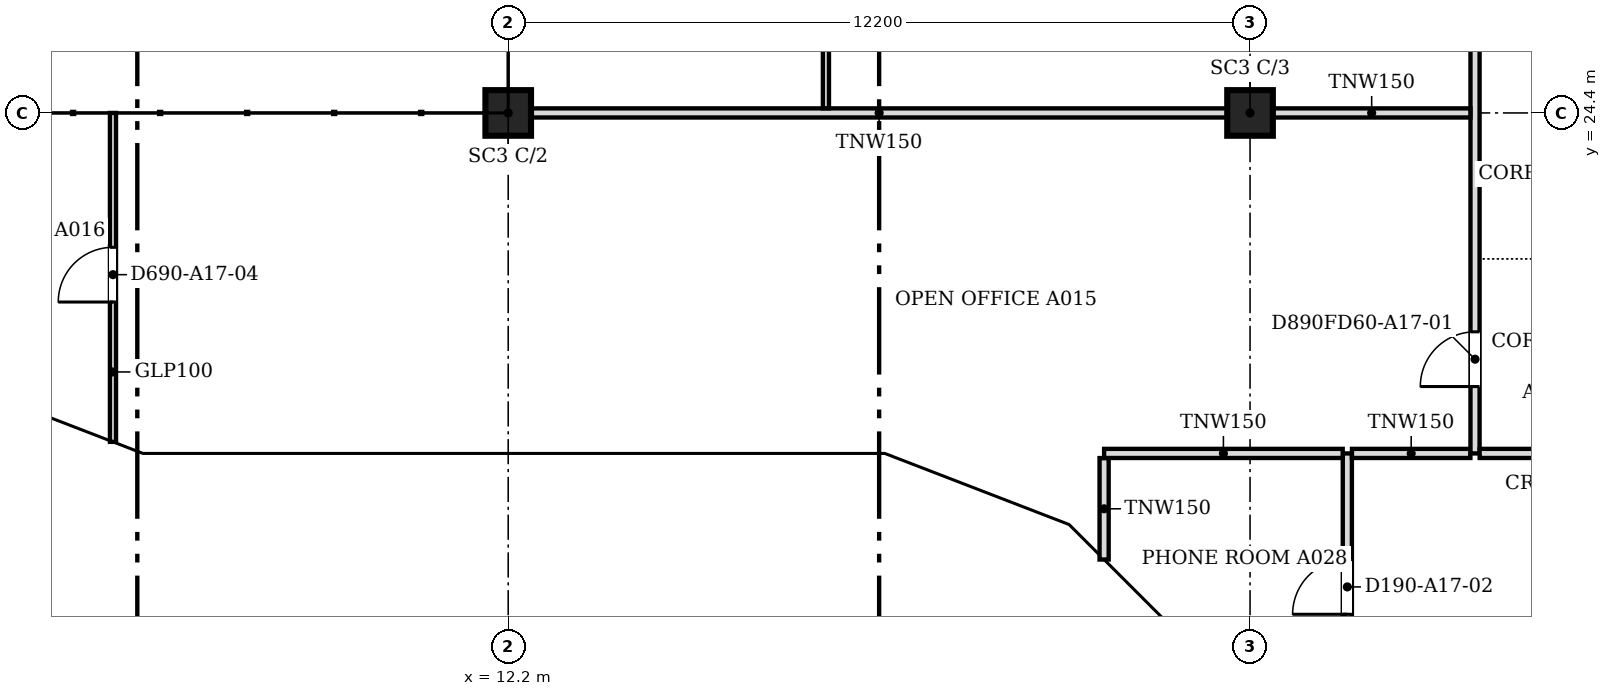
"""IFC4 building model, lengths in metres.
Left out: names, types, materials, properties, quantities, classifications, styles, units other than length and angle.
Written with IfcOpenShell. Run it as: python <this file> out.ifc"""

import sys

from ifc_helpers import new_model, si_unit, direction, frame, frame_2d, origin, origin_2d, place, context, subcontext, project, spatial, polyline, rectangle, outline, extrude, faceted_brep, source, transform, mapped, element, fill, save


model = new_model("IFC4")
c1 = context("Model", 3, precision=1e-05, world=origin(), true_north=direction((0.0, 1.0)))
c2 = subcontext(c1, "Body", "Model", "MODEL_VIEW")
j1 = project(units=[si_unit("LENGTHUNIT", "METRE"), si_unit("PLANEANGLEUNIT", "RADIAN")], contexts=[c1])
p1 = place(None, origin())
s1 = spatial("IfcSite", under=j1, at=p1, CompositionType="ELEMENT")
p2 = place(p1, origin())
s2 = spatial("IfcBuilding", under=s1, at=p2, CompositionType="ELEMENT")
p3 = place(p2, frame((0.0, 0.0, 189.6)))
s3 = spatial("IfcBuildingStorey", under=s2, at=p3, CompositionType="ELEMENT", Elevation=189.6)
for number, where, z_axis, x_axis in (
    (1, (12.2, 24.4, 0.0), (0.0, 0.0, 1.0), (1.0, 0.0, 0.0)),
    (2, (24.4, 24.4, 0.0), (0.0, 0.0, 1.0), (1.0, 0.0, 0.0)),
):
    element("IfcColumn", number, at=place(p3, frame(where, z_axis=z_axis, x_axis=x_axis)), inside=s3, PredefinedType="COLUMN", context=c2, shape_type="SweptSolid", body=[
        extrude(rectangle(XDim=0.75, YDim=0.75, at=origin_2d()), origin(), (0.0, 0.0, 1.0), 3.55),
    ])
m1 = source(origin(), c2, "Body", "Brep", [
    faceted_brep([(0.053, -0.25, 0.0), (3.003, -0.25, 3.8), (0.053, -0.25, 7.6), (0.0, -0.25, 7.531), (0.0, -0.25, 0.068), (0.106, 0.25, 7.532), (2.957, 0.25, 3.86), (2.957, 0.25, 3.74), (0.106, 0.25, 0.068), (3.003, 0.0, 3.8), (0.053, 0.0, 0.0), (0.053, 0.0, 7.6)], [[[0, 1, 2, 3, 4]], [[5, 6, 7, 8]], [[8, 7, 9, 1, 0, 10]], [[6, 5, 11, 2, 1, 9]], [[3, 2, 11]], [[10, 0, 4]], [[8, 10, 4, 3, 11, 5]], [[7, 6, 9]]]),
])
p4 = place(p3, frame((3.344, 19.631, -3.8), z_axis=(0.0, 0.0, 1.0), x_axis=(0.933007896601, -0.359855894603, 0.0)))
e3 = element("IfcWall", 3, at=p4, inside=s3, PredefinedType="SOLIDWALL", context=c2, shape_type="MappedRepresentation", body=[
    mapped(m1, transform((0.0, 0.0, 0.0), scale=1.0)),
])
m2 = source(origin(), c2, "Body", "SweptSolid", [
    extrude(outline(polyline([(0.253, 0.665), (2.687, 3.8), (0.253, 6.935), (0.253, 0.665)])), frame((0.0, 0.26, 0.0), z_axis=(0.0, -1.0, 0.0), x_axis=(1.0, 0.0, 0.0)), (0.0, 0.0, 1.0), 0.52),
])
p5 = place(p4, origin())
e4 = element("IfcOpeningElement", 4, at=p5, cuts=e3, PredefinedType="OPENING", context=c2, shape_type="MappedRepresentation", body=[
    mapped(m2, transform((0.0, 0.0, 0.0), scale=1.0)),
])
m3 = source(origin(), c2, "Body", "Brep", [
    faceted_brep([(3.003, -0.25, 0.0), (6.053, -0.25, 3.8), (3.003, -0.25, 7.6), (0.0, -0.25, 3.8), (0.047, 0.25, 3.859), (3.003, 0.25, 7.6), (6.053, 0.25, 3.8), (3.003, 0.25, 0.0), (0.047, 0.25, 3.741), (0.0, 0.0, 3.8)], [[[0, 1, 2, 3]], [[4, 5, 6, 7, 8]], [[7, 6, 1, 0]], [[6, 5, 2, 1]], [[5, 4, 9, 3, 2]], [[8, 7, 0, 3, 9]], [[8, 9, 4]]]),
])
p6 = place(p3, frame((6.146, 18.55, -3.8), z_axis=(0.0, 0.0, 1.0), x_axis=(1.0, 0.0, 0.0)))
e5 = element("IfcWall", 5, at=p6, inside=s3, PredefinedType="SOLIDWALL", context=c2, shape_type="MappedRepresentation", body=[
    mapped(m3, transform((0.0, 0.0, 0.0), scale=1.0)),
])
m4 = source(origin(), c2, "Body", "SweptSolid", [
    extrude(outline(polyline([(3.005, 0.401), (5.733, 3.8), (3.005, 7.199), (0.319, 3.8), (3.005, 0.401)])), frame((0.0, 0.26, 0.0), z_axis=(0.0, -1.0, 0.0), x_axis=(1.0, 0.0, 0.0)), (0.0, 0.0, 1.0), 0.52),
])
p7 = place(p6, origin())
e6 = element("IfcOpeningElement", 6, at=p7, cuts=e5, PredefinedType="OPENING", context=c2, shape_type="MappedRepresentation", body=[
    mapped(m4, transform((0.0, 0.0, 0.0), scale=1.0)),
])
m5 = source(origin(), c2, "Body", "Brep", [
    faceted_brep([(3.05, -0.25, 0.0), (6.1, -0.25, 3.743), (6.1, -0.25, 3.857), (3.05, -0.25, 7.6), (0.0, -0.25, 3.8), (0.0, 0.25, 3.8), (3.05, 0.25, 7.6), (6.146, 0.25, 3.8), (3.05, 0.25, 0.0), (6.146, -0.0, 3.8)], [[[0, 1, 2, 3, 4]], [[5, 6, 7, 8]], [[8, 7, 9, 1, 0]], [[7, 6, 3, 2, 9]], [[6, 5, 4, 3]], [[5, 8, 0, 4]], [[1, 9, 2]]]),
])
p8 = place(p3, frame((12.2, 18.55, -3.8), z_axis=(0.0, 0.0, 1.0), x_axis=(1.0, 0.0, 0.0)))
e7 = element("IfcWall", 7, at=p8, inside=s3, PredefinedType="SOLIDWALL", context=c2, shape_type="MappedRepresentation", body=[
    mapped(m5, transform((0.0, 0.0, 0.0), scale=1.0)),
])
m6 = source(origin(), c2, "Body", "SweptSolid", [
    extrude(outline(polyline([(3.052, 0.397), (5.824, 3.8), (3.052, 7.202), (0.321, 3.8), (3.052, 0.397)])), frame((0.0, 0.26, 0.0), z_axis=(0.0, -1.0, 0.0), x_axis=(1.0, 0.0, 0.0)), (0.0, 0.0, 1.0), 0.52),
])
p9 = place(p8, origin())
e8 = element("IfcOpeningElement", 8, at=p9, cuts=e7, PredefinedType="OPENING", context=c2, shape_type="MappedRepresentation", body=[
    mapped(m6, transform((0.0, 0.0, 0.0), scale=1.0)),
])
m7 = source(origin(), c2, "Body", "Brep", [
    faceted_brep([(3.096, -0.25, 7.536), (0.047, -0.25, 3.856), (0.047, -0.25, 3.744), (3.096, -0.25, 0.064), (0.0, 0.25, 3.8), (3.149, 0.25, 7.6), (3.202, 0.25, 7.536), (3.202, 0.25, 0.064), (3.149, 0.25, 0.0), (3.149, -0.0, 0.0), (3.149, -0.0, 7.6), (0.0, 0.0, 3.8)], [[[0, 1, 2, 3]], [[4, 5, 6, 7, 8]], [[8, 7, 9]], [[6, 5, 10]], [[5, 4, 11, 1, 0, 10]], [[4, 8, 9, 3, 2, 11]], [[2, 1, 11]], [[3, 9, 7, 6, 10, 0]]]),
])
p10 = place(p3, frame((18.346, 18.55, -3.8), z_axis=(0.0, 0.0, 1.0), x_axis=(0.932985567668, -0.359913782069, 0.0)))
e9 = element("IfcWall", 9, at=p10, inside=s3, PredefinedType="SOLIDWALL", context=c2, shape_type="MappedRepresentation", body=[
    mapped(m7, transform((0.0, 0.0, 0.0), scale=1.0)),
])
m8 = source(origin(), c2, "Body", "SweptSolid", [
    extrude(outline(polyline([(2.949, 6.967), (0.325, 3.8), (2.949, 0.633), (2.949, 6.967)])), frame((0.0, 0.26, 0.0), z_axis=(0.0, -1.0, 0.0), x_axis=(1.0, 0.0, 0.0)), (0.0, 0.0, 1.0), 0.52),
])
p11 = place(p10, origin())
e10 = element("IfcOpeningElement", 10, at=p11, cuts=e9, PredefinedType="OPENING", context=c2, shape_type="MappedRepresentation", body=[
    mapped(m8, transform((0.0, 0.0, 0.0), scale=1.0)),
])
m9 = source(origin(), c2, "Body", "Brep", [
    faceted_brep([(0.106, -0.25, 0.064), (3.156, -0.25, 3.736), (3.156, -0.25, 3.864), (0.106, -0.25, 7.536), (0.0, 0.25, 7.536), (0.053, 0.25, 7.6), (3.209, 0.25, 3.8), (0.053, 0.25, 0.0), (0.0, 0.25, 0.064), (3.209, -0.0, 3.8), (0.053, 0.0, 0.0), (0.053, 0.0, 7.6)], [[[0, 1, 2, 3]], [[4, 5, 6, 7, 8]], [[7, 6, 9, 1, 0, 10]], [[6, 5, 11, 3, 2, 9]], [[5, 4, 11]], [[8, 7, 10]], [[8, 10, 0, 3, 11, 4]], [[1, 9, 2]]]),
])
p12 = place(p3, frame((21.248, 17.454, -3.8), z_axis=(0.0, 0.0, 1.0), x_axis=(0.707106781187, -0.707106781187, 0.0)))
e11 = element("IfcWall", 11, at=p12, inside=s3, PredefinedType="SOLIDWALL", context=c2, shape_type="MappedRepresentation", body=[
    mapped(m9, transform((0.0, 0.0, 0.0), scale=1.0)),
])
m10 = source(origin(), c2, "Body", "SweptSolid", [
    extrude(outline(polyline([(0.253, 0.632), (2.884, 3.8), (0.253, 6.968), (0.253, 0.632)])), frame((0.0, 0.26, 0.0), z_axis=(0.0, -1.0, 0.0), x_axis=(1.0, 0.0, 0.0)), (0.0, 0.0, 1.0), 0.52),
])
p13 = place(p12, origin())
e12 = element("IfcOpeningElement", 12, at=p13, cuts=e11, PredefinedType="OPENING", context=c2, shape_type="MappedRepresentation", body=[
    mapped(m10, transform((0.0, 0.0, 0.0), scale=1.0)),
])
m11 = source(origin(), c2, "Body", "Brep", [
    faceted_brep([(2.95, -0.25, 0.0), (2.997, -0.25, 0.059), (2.997, -0.25, 3.8), (0.0, -0.25, 3.8), (0.053, 0.25, 3.8), (2.904, 0.25, 3.8), (2.904, 0.25, 0.06), (0.053, 0.25, 3.732), (2.95, 0.0, 0.0), (0.0, 0.0, 3.8)], [[[0, 1, 2, 3]], [[4, 5, 6, 7]], [[1, 0, 8]], [[5, 4, 9, 3, 2]], [[7, 6, 8, 0, 3, 9]], [[7, 9, 4]], [[1, 8, 6, 5, 2]]]),
])
p14 = place(p3, frame((3.394, 19.612, 0.0), z_axis=(0.0, 0.0, 1.0), x_axis=(0.932990326376, -0.359901446078, 0.0)))
e13 = element("IfcWall", 13, at=p14, inside=s3, PredefinedType="SOLIDWALL", context=c2, shape_type="MappedRepresentation", body=[
    mapped(m11, transform((0.0, 0.0, 0.0), scale=1.0)),
])
m12 = source(origin(), c2, "Body", "SweptSolid", [
    extrude(outline(polyline([(2.75, 3.55), (0.511, 3.55), (2.75, 0.665), (2.75, 3.55)])), frame((0.0, 0.26, 0.0), z_axis=(0.0, -1.0, 0.0), x_axis=(1.0, 0.0, 0.0)), (0.0, 0.0, 1.0), 0.52),
])
p15 = place(p14, origin())
e14 = element("IfcOpeningElement", 14, at=p15, cuts=e13, PredefinedType="OPENING", context=c2, shape_type="MappedRepresentation", body=[
    mapped(m12, transform((0.0, 0.0, 0.0), scale=1.0)),
])
m13 = source(origin(), c2, "Body", "Brep", [
    faceted_brep([(0.047, -0.25, 0.0), (3.05, -0.25, 3.8), (0.0, -0.25, 3.8), (0.0, -0.25, 0.06), (0.093, 0.25, 3.8), (3.05, 0.25, 3.8), (0.093, 0.25, 0.059), (0.047, 0.0, 0.0)], [[[0, 1, 2, 3]], [[4, 5, 6]], [[6, 5, 1, 0, 7]], [[5, 4, 2, 1]], [[7, 0, 3]], [[6, 7, 3, 2, 4]]]),
])
p16 = place(p3, frame((6.1, 18.55, 0.0), z_axis=(0.0, 0.0, 1.0), x_axis=(1.0, 0.0, 0.0)))
e15 = element("IfcWall", 15, at=p16, inside=s3, PredefinedType="SOLIDWALL", context=c2, shape_type="MappedRepresentation", body=[
    mapped(m13, transform((0.0, 0.0, 0.0), scale=1.0)),
])
m14 = source(origin(), c2, "Body", "SweptSolid", [
    extrude(outline(polyline([(0.247, 0.656), (2.534, 3.55), (0.247, 3.55), (0.247, 0.656)])), frame((0.0, 0.26, 0.0), z_axis=(0.0, -1.0, 0.0), x_axis=(1.0, 0.0, 0.0)), (0.0, 0.0, 1.0), 0.52),
])
p17 = place(p16, origin())
e16 = element("IfcOpeningElement", 16, at=p17, cuts=e15, PredefinedType="OPENING", context=c2, shape_type="MappedRepresentation", body=[
    mapped(m14, transform((0.0, 0.0, 0.0), scale=1.0)),
])
m15 = source(origin(), c2, "Body", "SweptSolid", [
    extrude(outline(polyline([(3.05, 0.0), (6.1, 3.8), (0.0, 3.8), (3.05, 0.0)])), frame((0.0, 0.25, 0.0), z_axis=(0.0, -1.0, 0.0), x_axis=(1.0, 0.0, 0.0)), (0.0, 0.0, 1.0), 0.5),
])
p18 = place(p3, frame((9.15, 18.55, 0.0), z_axis=(0.0, 0.0, 1.0), x_axis=(1.0, 0.0, 0.0)))
e17 = element("IfcWall", 17, at=p18, inside=s3, PredefinedType="SOLIDWALL", context=c2, shape_type="MappedRepresentation", body=[
    mapped(m15, transform((0.0, 0.0, 0.0), scale=1.0)),
])
m16 = source(origin(), c2, "Body", "SweptSolid", [
    extrude(outline(polyline([(3.05, 0.399), (5.579, 3.55), (0.521, 3.55), (3.05, 0.399)])), frame((0.0, 0.26, 0.0), z_axis=(0.0, -1.0, 0.0), x_axis=(1.0, 0.0, 0.0)), (0.0, 0.0, 1.0), 0.52),
])
p19 = place(p18, origin())
e18 = element("IfcOpeningElement", 18, at=p19, cuts=e17, PredefinedType="OPENING", context=c2, shape_type="MappedRepresentation", body=[
    mapped(m16, transform((0.0, 0.0, 0.0), scale=1.0)),
])
m17 = source(origin(), c2, "Body", "Brep", [
    faceted_brep([(3.05, -0.25, 3.8), (0.0, -0.25, 3.8), (3.05, -0.25, 0.057), (0.0, 0.25, 3.8), (3.143, 0.25, 3.8), (3.143, 0.25, 0.056), (3.096, 0.25, 0.0), (3.096, -0.0, 0.0)], [[[0, 1, 2]], [[3, 4, 5, 6]], [[6, 5, 7]], [[4, 3, 1, 0]], [[3, 6, 7, 2, 1]], [[2, 7, 5, 4, 0]]]),
])
p20 = place(p3, frame((15.25, 18.55, 0.0), z_axis=(0.0, 0.0, 1.0), x_axis=(1.0, 0.0, 0.0)))
e19 = element("IfcWall", 19, at=p20, inside=s3, PredefinedType="SOLIDWALL", context=c2, shape_type="MappedRepresentation", body=[
    mapped(m17, transform((0.0, 0.0, 0.0), scale=1.0)),
])
m18 = source(origin(), c2, "Body", "SweptSolid", [
    extrude(outline(polyline([(2.896, 3.55), (0.526, 3.55), (2.896, 0.641), (2.896, 3.55)])), frame((0.0, 0.26, 0.0), z_axis=(0.0, -1.0, 0.0), x_axis=(1.0, 0.0, 0.0)), (0.0, 0.0, 1.0), 0.52),
])
p21 = place(p20, origin())
e20 = element("IfcOpeningElement", 20, at=p21, cuts=e19, PredefinedType="OPENING", context=c2, shape_type="MappedRepresentation", body=[
    mapped(m18, transform((0.0, 0.0, 0.0), scale=1.0)),
])
m19 = source(origin(), c2, "Body", "Brep", [
    faceted_brep([(0.093, -0.25, 0.056), (3.143, -0.25, 3.736), (3.143, -0.25, 3.8), (0.093, -0.25, 3.8), (0.0, 0.25, 3.8), (3.196, 0.25, 3.8), (0.047, 0.25, 0.0), (0.0, 0.25, 0.057), (3.196, -0.0, 3.8), (0.047, 0.0, 0.0)], [[[0, 1, 2, 3]], [[4, 5, 6, 7]], [[6, 5, 8, 1, 0, 9]], [[5, 4, 3, 2, 8]], [[7, 6, 9]], [[7, 9, 0, 3, 4]], [[1, 8, 2]]]),
])
p22 = place(p3, frame((18.303, 18.567, 0.0), z_axis=(0.0, 0.0, 1.0), x_axis=(0.932978940178, -0.359930961693, 0.0)))
e21 = element("IfcWall", 21, at=p22, inside=s3, PredefinedType="SOLIDWALL", context=c2, shape_type="MappedRepresentation", body=[
    mapped(m19, transform((0.0, 0.0, 0.0), scale=1.0)),
])
m20 = source(origin(), c2, "Body", "SweptSolid", [
    extrude(outline(polyline([(0.247, 0.633), (2.664, 3.55), (0.247, 3.55), (0.247, 0.633)])), frame((0.0, 0.26, 0.0), z_axis=(0.0, -1.0, 0.0), x_axis=(1.0, 0.0, 0.0)), (0.0, 0.0, 1.0), 0.52),
])
p23 = place(p22, origin())
e22 = element("IfcOpeningElement", 22, at=p23, cuts=e21, PredefinedType="OPENING", context=c2, shape_type="MappedRepresentation", body=[
    mapped(m20, transform((0.0, 0.0, 0.0), scale=1.0)),
])
m21 = source(origin(), c2, "Body", "Brep", [
    faceted_brep([(3.103, -0.25, 3.8), (0.053, -0.25, 3.8), (0.053, -0.25, 3.736), (3.103, -0.25, 0.064), (0.0, 0.25, 3.8), (3.209, 0.25, 3.8), (3.209, 0.25, 0.064), (3.156, 0.25, 0.0), (3.156, -0.0, 0.0), (0.0, 0.0, 3.8)], [[[0, 1, 2, 3]], [[4, 5, 6, 7]], [[7, 6, 8]], [[5, 4, 9, 1, 0]], [[4, 7, 8, 3, 2, 9]], [[2, 1, 9]], [[3, 8, 6, 5, 0]]]),
])
p24 = place(p3, frame((21.285, 17.417, 0.0), z_axis=(0.0, 0.0, 1.0), x_axis=(0.707106781187, -0.707106781187, 0.0)))
e23 = element("IfcWall", 23, at=p24, inside=s3, PredefinedType="SOLIDWALL", context=c2, shape_type="MappedRepresentation", body=[
    mapped(m21, transform((0.0, 0.0, 0.0), scale=1.0)),
])
m22 = source(origin(), c2, "Body", "SweptSolid", [
    extrude(outline(polyline([(2.956, 3.55), (0.533, 3.55), (2.956, 0.632), (2.956, 3.55)])), frame((0.0, 0.26, 0.0), z_axis=(0.0, -1.0, 0.0), x_axis=(1.0, 0.0, 0.0)), (0.0, 0.0, 1.0), 0.52),
])
p25 = place(p24, origin())
e24 = element("IfcOpeningElement", 24, at=p25, cuts=e23, PredefinedType="OPENING", context=c2, shape_type="MappedRepresentation", body=[
    mapped(m22, transform((0.0, 0.0, 0.0), scale=1.0)),
])
p26 = place(p3, frame((26.0, 10.276, 0.0), z_axis=(0.0, 0.0, 1.0), x_axis=(0.0, 1.0, 0.0)))
e25 = element("IfcWall", 25, at=p26, inside=s3, PredefinedType="PARTITIONING", context=c2, shape_type="SweptSolid", body=[
    extrude(rectangle(XDim=8.524, YDim=0.15, at=frame_2d((4.262, 0.0))), origin(), (0.0, 0.0, 1.0), 2.947),
])
m23 = source(origin(), c2, "Body", "SweptSolid", [
    extrude(rectangle(XDim=0.9, YDim=2.1, at=frame_2d((0.45, 1.05))), frame((0.0, 0.085, 0.0), z_axis=(0.0, -1.0, 0.0), x_axis=(1.0, 0.0, 0.0)), (0.0, 0.0, 1.0), 0.17),
])
p27 = place(p26, frame((1.6, 0.0, 0.0)))
e26 = element("IfcOpeningElement", 26, at=p27, cuts=e25, PredefinedType="OPENING", context=c2, shape_type="MappedRepresentation", body=[
    mapped(m23, transform((0.0, 0.0, 0.0), scale=1.0)),
])
p28 = place(p26, frame((5.879, 0.0, 0.0)))
e27 = element("IfcOpeningElement", 27, at=p28, cuts=e25, PredefinedType="OPENING", context=c2, shape_type="MappedRepresentation", body=[
    mapped(m23, transform((0.0, 0.0, 0.0), scale=1.0)),
])
p29 = place(p3, frame((22.0, 17.055, 0.0), z_axis=(0.0, 0.0, 1.0), x_axis=(0.0, 1.0, 0.0)))
e28 = element("IfcWall", 28, at=p29, inside=s3, PredefinedType="PARTITIONING", context=c2, shape_type="SweptSolid", body=[
    extrude(rectangle(XDim=1.669, YDim=0.15, at=frame_2d((0.834, 0.0))), origin(), (0.0, 0.0, 1.0), 2.947),
])
p30 = place(p3, frame((22.0, 18.8, 0.0), z_axis=(0.0, 0.0, 1.0), x_axis=(1.0, 0.0, 0.0)))
e29 = element("IfcWall", 29, at=p30, inside=s3, PredefinedType="PARTITIONING", context=c2, shape_type="SweptSolid", body=[
    extrude(rectangle(XDim=3.924, YDim=0.15, at=frame_2d((1.962, 0.0))), origin(), (0.0, 0.0, 1.0), 2.947),
])
p31 = place(p3, frame((26.076, 18.8, 0.0), z_axis=(0.0, 0.0, 1.0), x_axis=(1.0, 0.0, 0.0)))
e30 = element("IfcWall", 30, at=p31, inside=s3, PredefinedType="PARTITIONING", context=c2, shape_type="SweptSolid", body=[
    extrude(rectangle(XDim=1.948, YDim=0.15, at=frame_2d((0.974, 0.0))), origin(), (0.0, 0.0, 1.0), 2.947),
])
p32 = place(p3, frame((28.1, 18.8, 0.0), z_axis=(0.0, 0.0, 1.0), x_axis=(0.0, 1.0, 0.0)))
e31 = element("IfcWall", 31, at=p32, inside=s3, PredefinedType="PARTITIONING", context=c2, shape_type="SweptSolid", body=[
    extrude(rectangle(XDim=26.424, YDim=0.15, at=frame_2d((13.212, 0.0))), origin(), (0.0, 0.0, 1.0), 2.947),
])
p33 = place(p32, frame((1.1, 0.0, 0.0)))
e32 = element("IfcOpeningElement", 32, at=p33, cuts=e31, PredefinedType="OPENING", context=c2, shape_type="MappedRepresentation", body=[
    mapped(m23, transform((0.0, 0.0, 0.0), scale=1.0)),
])
p34 = place(p32, frame((14.301, 0.0, 0.0)))
e33 = element("IfcOpeningElement", 33, at=p34, cuts=e31, PredefinedType="OPENING", context=c2, shape_type="MappedRepresentation", body=[
    mapped(m23, transform((0.0, 0.0, 0.0), scale=1.0)),
])
p35 = place(p32, frame((8.2, 0.0, 0.0)))
e34 = element("IfcOpeningElement", 34, at=p35, cuts=e31, PredefinedType="OPENING", context=c2, shape_type="MappedRepresentation", body=[
    mapped(m23, transform((0.0, 0.0, 0.0), scale=1.0)),
])
m24 = source(origin(), c2, "Body", "SweptSolid", [
    extrude(rectangle(XDim=1.0, YDim=2.1, at=frame_2d((0.5, 1.05))), frame((0.0, 0.085, 0.0), z_axis=(0.0, -1.0, 0.0), x_axis=(1.0, 0.0, 0.0)), (0.0, 0.0, 1.0), 0.17),
])
p36 = place(p32, frame((21.6, 0.0, 0.0)))
e35 = element("IfcOpeningElement", 35, at=p36, cuts=e31, PredefinedType="OPENING", context=c2, shape_type="MappedRepresentation", body=[
    mapped(m24, transform((0.0, 0.0, 0.0), scale=1.0)),
])
p37 = place(p3, frame((28.176, 18.8, 0.0), z_axis=(0.0, 0.0, 1.0), x_axis=(1.0, 0.0, 0.0)))
e36 = element("IfcWall", 36, at=p37, inside=s3, PredefinedType="PARTITIONING", context=c2, shape_type="SweptSolid", body=[
    extrude(rectangle(XDim=2.248, YDim=0.15, at=frame_2d((1.124, 0.0))), origin(), (0.0, 0.0, 1.0), 2.947),
])
p38 = place(p3, frame((5.7, 18.99, 0.0), z_axis=(0.0, 0.0, 1.0), x_axis=(0.0, 1.0, 0.0)))
e37 = element("IfcWall", 37, at=p38, inside=s3, PredefinedType="PARTITIONING", context=c2, shape_type="SweptSolid", body=[
    extrude(rectangle(XDim=5.41, YDim=0.1, at=frame_2d((2.705, 0.0))), origin(), (0.0, 0.0, 1.0), 2.947),
])
m25 = source(origin(), c2, "Body", "SweptSolid", [
    extrude(rectangle(XDim=0.9, YDim=2.1, at=frame_2d((0.45, 1.05))), frame((0.0, 0.06, 0.0), z_axis=(0.0, -1.0, 0.0), x_axis=(1.0, 0.0, 0.0)), (0.0, 0.0, 1.0), 0.12),
])
p39 = place(p38, frame((2.3, 0.0, 0.0)))
e38 = element("IfcOpeningElement", 38, at=p39, cuts=e37, PredefinedType="OPENING", context=c2, shape_type="MappedRepresentation", body=[
    mapped(m25, transform((0.0, 0.0, 0.0), scale=1.0)),
])
p40 = place(p3, frame((12.576, 24.4, 0.0), z_axis=(0.0, 0.0, 1.0), x_axis=(1.0, 0.0, 0.0)))
e39 = element("IfcWall", 39, at=p40, inside=s3, PredefinedType="PARTITIONING", context=c2, shape_type="SweptSolid", body=[
    extrude(rectangle(XDim=11.448, YDim=0.15, at=frame_2d((5.724, 0.0))), origin(), (0.0, 0.0, 1.0), 2.947),
])
p41 = place(p3, frame((24.776, 24.4, 0.0), z_axis=(0.0, 0.0, 1.0), x_axis=(1.0, 0.0, 0.0)))
e40 = element("IfcWall", 40, at=p41, inside=s3, PredefinedType="PARTITIONING", context=c2, shape_type="SweptSolid", body=[
    extrude(rectangle(XDim=3.248, YDim=0.15, at=frame_2d((1.624, 0.0))), origin(), (0.0, 0.0, 1.0), 2.947),
])
p42 = place(p3, frame((17.425, 24.476, 0.0), z_axis=(0.0, 0.0, 1.0), x_axis=(0.0, 1.0, 0.0)))
e41 = element("IfcWall", 41, at=p42, inside=s3, PredefinedType="PARTITIONING", context=c2, shape_type="SweptSolid", body=[
    extrude(rectangle(XDim=5.948, YDim=0.1, at=frame_2d((2.974, 0.0))), origin(), (0.0, 0.0, 1.0), 2.947),
])
p43 = place(p42, frame((2.5, 0.0, 0.0)))
e42 = element("IfcOpeningElement", 42, at=p43, cuts=e41, PredefinedType="OPENING", context=c2, shape_type="MappedRepresentation", body=[
    mapped(m25, transform((0.0, 0.0, 0.0), scale=1.0)),
])
m26 = source(origin(), c2, "Body", "SweptSolid", [
    extrude(rectangle(XDim=0.9, YDim=2.1, at=frame_2d((0.45, 1.05))), frame((0.0, 0.025, 0.0), z_axis=(0.0, -1.0, 0.0), x_axis=(1.0, 0.0, 0.0)), (0.0, 0.0, 1.0), 0.05),
])
p44 = place(p33, origin())
e43 = element("IfcDoor", 43, at=p44, inside=s3, OperationType="SINGLE_SWING_LEFT", PredefinedType="DOOR", context=c2, shape_type="MappedRepresentation", body=[
    mapped(m26, transform((0.0, 0.0, 0.0), scale=1.0)),
])
fill(e32, e43)
p45 = place(p28, origin())
e44 = element("IfcDoor", 44, at=p45, inside=s3, OperationType="SINGLE_SWING_LEFT", PredefinedType="DOOR", context=c2, shape_type="MappedRepresentation", body=[
    mapped(m26, transform((0.0, 0.0, 0.0), scale=1.0)),
])
fill(e27, e44)
p46 = place(p39, origin())
e45 = element("IfcDoor", 45, at=p46, inside=s3, OperationType="SINGLE_SWING_LEFT", PredefinedType="DOOR", context=c2, shape_type="MappedRepresentation", body=[
    mapped(m26, transform((0.0, 0.0, 0.0), scale=1.0)),
])
fill(e38, e45)
save(model, sys.argv[1])
